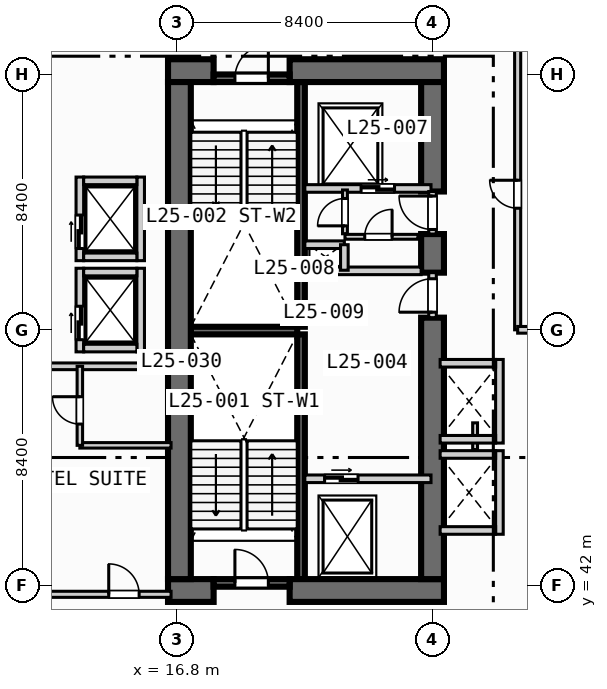
"""IFC4 building model, lengths in metres.
Left out: names, types, materials, properties, quantities, classifications, styles, units other than length and angle.
Written with IfcOpenShell. Run it as: python <this file> out.ifc"""

import sys

from ifc_helpers import new_model, si_unit, direction, frame, frame_2d, origin, place, context, subcontext, project, spatial, rectangle, extrude, element, fill, save


model = new_model("IFC4")
c1 = context("Model", 3, precision=1e-05, world=origin(), true_north=direction((0.0, 1.0)))
c2 = subcontext(c1, "Body", "Model", "MODEL_VIEW")
j1 = project(units=[si_unit("LENGTHUNIT", "METRE"), si_unit("PLANEANGLEUNIT", "RADIAN")], contexts=[c1])
p1 = place(None, origin())
s1 = spatial("IfcSite", under=j1, at=p1, CompositionType="ELEMENT")
p2 = place(p1, origin())
s2 = spatial("IfcBuilding", under=s1, at=p2, CompositionType="ELEMENT")
p3 = place(p2, frame((0.0, 0.0, 107.6)))
s3 = spatial("IfcBuildingStorey", under=s2, at=p3, CompositionType="ELEMENT", Elevation=107.6)
for number, where, z_axis, x_axis in (
    (1, (20.875, 42.2, 0.0), (0.0, 0.0, 1.0), (0.0, 1.0, 0.0)),
    (2, (20.875, 50.5, 0.0), (0.0, 0.0, 1.0), (0.0, 1.0, 0.0)),
):
    element("IfcWall", number, at=place(p3, frame(where, z_axis=z_axis, x_axis=x_axis)), inside=s3, PredefinedType="SOLIDWALL", context=c2, shape_type="SweptSolid", body=[
        extrude(rectangle(XDim=8.05, YDim=0.25, at=frame_2d((4.025, 0.0))), origin(), (0.0, 0.0, 1.0), 3.55),
    ])
p4 = place(p3, frame((17.25, 50.375, 0.0), z_axis=(0.0, 0.0, 1.0), x_axis=(1.0, 0.0, 0.0)))
e3 = element("IfcWall", 3, at=p4, inside=s3, PredefinedType="SOLIDWALL", context=c2, shape_type="SweptSolid", body=[
    extrude(rectangle(XDim=3.5, YDim=0.25, at=frame_2d((1.75, 0.0))), origin(), (0.0, 0.0, 1.0), 3.55),
])
p5 = place(p3, frame((16.5, 41.825, 0.0), z_axis=(0.0, 0.0, 1.0), x_axis=(1.0, 0.0, 0.0)))
e4 = element("IfcWall", 4, at=p5, inside=s3, PredefinedType="SHEAR", context=c2, shape_type="SweptSolid", body=[
    extrude(rectangle(XDim=1.5, YDim=0.75, at=frame_2d((0.75, 0.0))), origin(), (0.0, 0.0, 1.0), 3.55),
])
p6 = place(p3, frame((20.5, 41.825, 0.0), z_axis=(0.0, 0.0, 1.0), x_axis=(1.0, 0.0, 0.0)))
e5 = element("IfcWall", 5, at=p6, inside=s3, PredefinedType="SHEAR", context=c2, shape_type="SweptSolid", body=[
    extrude(rectangle(XDim=5.075, YDim=0.75, at=frame_2d((2.538, 0.0))), origin(), (0.0, 0.0, 1.0), 3.55),
])
p7 = place(p3, frame((16.5, 58.925, 0.0), z_axis=(0.0, 0.0, 1.0), x_axis=(1.0, 0.0, 0.0)))
e6 = element("IfcWall", 6, at=p7, inside=s3, PredefinedType="SHEAR", context=c2, shape_type="SweptSolid", body=[
    extrude(rectangle(XDim=1.5, YDim=0.75, at=frame_2d((0.75, 0.0))), origin(), (0.0, 0.0, 1.0), 3.55),
])
p8 = place(p3, frame((20.5, 58.925, 0.0), z_axis=(0.0, 0.0, 1.0), x_axis=(1.0, 0.0, 0.0)))
e7 = element("IfcWall", 7, at=p8, inside=s3, PredefinedType="SHEAR", context=c2, shape_type="SweptSolid", body=[
    extrude(rectangle(XDim=5.075, YDim=0.75, at=frame_2d((2.538, 0.0))), origin(), (0.0, 0.0, 1.0), 3.55),
])
p9 = place(p3, frame((16.875, 42.2, 0.0), z_axis=(0.0, 0.0, 1.0), x_axis=(0.0, 1.0, 0.0)))
e8 = element("IfcWall", 8, at=p9, inside=s3, PredefinedType="SHEAR", context=c2, shape_type="SweptSolid", body=[
    extrude(rectangle(XDim=16.35, YDim=0.75, at=frame_2d((8.175, 0.0))), origin(), (0.0, 0.0, 1.0), 3.55),
])
p10 = place(p3, frame((25.2, 42.2, 0.0), z_axis=(0.0, 0.0, 1.0), x_axis=(0.0, 1.0, 0.0)))
e9 = element("IfcWall", 9, at=p10, inside=s3, PredefinedType="SHEAR", context=c2, shape_type="SweptSolid", body=[
    extrude(rectangle(XDim=8.6, YDim=0.75, at=frame_2d((4.3, 0.0))), origin(), (0.0, 0.0, 1.0), 3.55),
])
p11 = place(p3, frame((25.2, 52.28, 0.0), z_axis=(0.0, 0.0, 1.0), x_axis=(0.0, 1.0, 0.0)))
e10 = element("IfcWall", 10, at=p11, inside=s3, PredefinedType="SHEAR", context=c2, shape_type="SweptSolid", body=[
    extrude(rectangle(XDim=1.27, YDim=0.75, at=frame_2d((0.635, 0.0))), origin(), (0.0, 0.0, 1.0), 3.55),
])
p12 = place(p3, frame((25.2, 54.95, 0.0), z_axis=(0.0, 0.0, 1.0), x_axis=(0.0, 1.0, 0.0)))
e11 = element("IfcWall", 11, at=p12, inside=s3, PredefinedType="SHEAR", context=c2, shape_type="SweptSolid", body=[
    extrude(rectangle(XDim=3.6, YDim=0.75, at=frame_2d((1.8, 0.0))), origin(), (0.0, 0.0, 1.0), 3.55),
])
p13 = place(p3, frame((18.0, 42.075, 0.0), z_axis=(0.0, 0.0, 1.0), x_axis=(1.0, 0.0, 0.0)))
e12 = element("IfcWall", 12, at=p13, inside=s3, PredefinedType="SOLIDWALL", context=c2, shape_type="SweptSolid", body=[
    extrude(rectangle(XDim=2.5, YDim=0.25, at=frame_2d((1.25, 0.0))), origin(), (0.0, 0.0, 1.0), 3.55),
])
p14 = place(p13, frame((0.7, 0.0, 0.0)))
e13 = element("IfcOpeningElement", 13, at=p14, cuts=e12, PredefinedType="OPENING", context=c2, shape_type="SweptSolid", body=[
    extrude(rectangle(XDim=1.1, YDim=2.15, at=frame_2d((0.55, 1.075))), frame((0.0, 0.135, 0.0), z_axis=(0.0, -1.0, 0.0), x_axis=(1.0, 0.0, 0.0)), (0.0, 0.0, 1.0), 0.27),
])
p15 = place(p3, frame((18.0, 58.675, 0.0), z_axis=(0.0, 0.0, 1.0), x_axis=(1.0, 0.0, 0.0)))
e14 = element("IfcWall", 14, at=p15, inside=s3, PredefinedType="SOLIDWALL", context=c2, shape_type="SweptSolid", body=[
    extrude(rectangle(XDim=2.5, YDim=0.25, at=frame_2d((1.25, 0.0))), origin(), (0.0, 0.0, 1.0), 3.55),
])
p16 = place(p15, frame((0.7, 0.0, 0.0)))
e15 = element("IfcOpeningElement", 15, at=p16, cuts=e14, PredefinedType="OPENING", context=c2, shape_type="SweptSolid", body=[
    extrude(rectangle(XDim=1.1, YDim=2.15, at=frame_2d((0.55, 1.075))), frame((0.0, 0.135, 0.0), z_axis=(0.0, -1.0, 0.0), x_axis=(1.0, 0.0, 0.0)), (0.0, 0.0, 1.0), 0.27),
])
p17 = place(p3, frame((21.0, 45.5, 0.0), z_axis=(0.0, 0.0, 1.0), x_axis=(1.0, 0.0, 0.0)))
e16 = element("IfcWall", 16, at=p17, inside=s3, PredefinedType="SOLIDWALL", context=c2, shape_type="SweptSolid", body=[
    extrude(rectangle(XDim=4.15, YDim=0.25, at=frame_2d((2.075, 0.0))), origin(), (0.0, 0.0, 1.0), 3.55),
])
p18 = place(p17, frame((0.65, 0.0, 0.0)))
e17 = element("IfcOpeningElement", 17, at=p18, cuts=e16, PredefinedType="OPENING", context=c2, shape_type="SweptSolid", body=[
    extrude(rectangle(XDim=1.1, YDim=2.15, at=frame_2d((0.55, 1.075))), frame((0.0, 0.135, 0.0), z_axis=(0.0, -1.0, 0.0), x_axis=(1.0, 0.0, 0.0)), (0.0, 0.0, 1.0), 0.27),
])
p19 = place(p3, frame((25.2, 50.8, 0.0), z_axis=(0.0, 0.0, 1.0), x_axis=(0.0, 1.0, 0.0)))
e18 = element("IfcWall", 18, at=p19, inside=s3, PredefinedType="SOLIDWALL", context=c2, shape_type="SweptSolid", body=[
    extrude(rectangle(XDim=1.48, YDim=0.25, at=frame_2d((0.74, 0.0))), origin(), (0.0, 0.0, 1.0), 3.55),
])
p20 = place(p19, frame((0.18, 0.0, 0.0)))
e19 = element("IfcOpeningElement", 19, at=p20, cuts=e18, PredefinedType="OPENING", context=c2, shape_type="SweptSolid", body=[
    extrude(rectangle(XDim=1.1, YDim=2.15, at=frame_2d((0.55, 1.075))), frame((0.0, 0.135, 0.0), z_axis=(0.0, -1.0, 0.0), x_axis=(1.0, 0.0, 0.0)), (0.0, 0.0, 1.0), 0.27),
])
p21 = place(p3, frame((21.0, 52.34, 0.0), z_axis=(0.0, 0.0, 1.0), x_axis=(1.0, 0.0, 0.0)))
e20 = element("IfcWall", 20, at=p21, inside=s3, PredefinedType="SOLIDWALL", context=c2, shape_type="SweptSolid", body=[
    extrude(rectangle(XDim=3.825, YDim=0.25, at=frame_2d((1.913, 0.0))), origin(), (0.0, 0.0, 1.0), 3.55),
])
p22 = place(p3, frame((21.0, 55.05, 0.0), z_axis=(0.0, 0.0, 1.0), x_axis=(1.0, 0.0, 0.0)))
e21 = element("IfcWall", 21, at=p22, inside=s3, PredefinedType="SOLIDWALL", context=c2, shape_type="SweptSolid", body=[
    extrude(rectangle(XDim=4.15, YDim=0.25, at=frame_2d((2.075, 0.0))), origin(), (0.0, 0.0, 1.0), 3.55),
])
p23 = place(p22, frame((1.85, 0.0, 0.0)))
e22 = element("IfcOpeningElement", 22, at=p23, cuts=e21, PredefinedType="OPENING", context=c2, shape_type="SweptSolid", body=[
    extrude(rectangle(XDim=1.1, YDim=2.15, at=frame_2d((0.55, 1.075))), frame((0.0, 0.135, 0.0), z_axis=(0.0, -1.0, 0.0), x_axis=(1.0, 0.0, 0.0)), (0.0, 0.0, 1.0), 0.27),
])
p24 = place(p3, frame((25.2, 53.55, 0.0), z_axis=(0.0, 0.0, 1.0), x_axis=(0.0, 1.0, 0.0)))
e23 = element("IfcWall", 23, at=p24, inside=s3, PredefinedType="SOLIDWALL", context=c2, shape_type="SweptSolid", body=[
    extrude(rectangle(XDim=1.4, YDim=0.25, at=frame_2d((0.7, 0.0))), origin(), (0.0, 0.0, 1.0), 3.55),
])
p25 = place(p24, frame((0.15, 0.0, 0.0)))
e24 = element("IfcOpeningElement", 24, at=p25, cuts=e23, PredefinedType="OPENING", context=c2, shape_type="SweptSolid", body=[
    extrude(rectangle(XDim=1.1, YDim=2.15, at=frame_2d((0.55, 1.075))), frame((0.0, 0.135, 0.0), z_axis=(0.0, -1.0, 0.0), x_axis=(1.0, 0.0, 0.0)), (0.0, 0.0, 1.0), 0.27),
])
p26 = place(p3, frame((21.0, 53.2, 0.0), z_axis=(0.0, 0.0, 1.0), x_axis=(1.0, 0.0, 0.0)))
e25 = element("IfcWall", 25, at=p26, inside=s3, PredefinedType="SOLIDWALL", context=c2, shape_type="SweptSolid", body=[
    extrude(rectangle(XDim=1.3, YDim=0.25, at=frame_2d((0.65, 0.0))), origin(), (0.0, 0.0, 1.0), 3.55),
])
p27 = place(p3, frame((22.3, 52.36, 0.0), z_axis=(0.0, 0.0, 1.0), x_axis=(0.0, 1.0, 0.0)))
e26 = element("IfcWall", 26, at=p27, inside=s3, PredefinedType="SOLIDWALL", context=c2, shape_type="SweptSolid", body=[
    extrude(rectangle(XDim=0.84, YDim=0.25, at=frame_2d((0.42, 0.0))), origin(), (0.0, 0.0, 1.0), 3.55),
])
p28 = place(p3, frame((22.32, 53.56, 0.0), z_axis=(0.0, 0.0, 1.0), x_axis=(0.0, 1.0, 0.0)))
e27 = element("IfcWall", 27, at=p28, inside=s3, PredefinedType="PARTITIONING", context=c2, shape_type="SweptSolid", body=[
    extrude(rectangle(XDim=1.44, YDim=0.16, at=frame_2d((0.72, 0.0))), origin(), (0.0, 0.0, 1.0), 3.55),
])
p29 = place(p28, frame((0.26, 0.0, 0.0)))
e28 = element("IfcOpeningElement", 28, at=p29, cuts=e27, PredefinedType="OPENING", context=c2, shape_type="SweptSolid", body=[
    extrude(rectangle(XDim=0.9, YDim=2.1, at=frame_2d((0.45, 1.05))), frame((0.0, 0.09, 0.0), z_axis=(0.0, -1.0, 0.0), x_axis=(1.0, 0.0, 0.0)), (0.0, 0.0, 1.0), 0.18),
])
p30 = place(p3, frame((22.32, 53.46, 0.0), z_axis=(0.0, 0.0, 1.0), x_axis=(1.0, 0.0, 0.0)))
e29 = element("IfcWall", 29, at=p30, inside=s3, PredefinedType="PARTITIONING", context=c2, shape_type="SweptSolid", body=[
    extrude(rectangle(XDim=2.4, YDim=0.16, at=frame_2d((1.2, 0.0))), origin(), (0.0, 0.0, 1.0), 3.55),
])
p31 = place(p30, frame((0.65, 0.0, 0.0)))
e30 = element("IfcOpeningElement", 30, at=p31, cuts=e29, PredefinedType="OPENING", context=c2, shape_type="SweptSolid", body=[
    extrude(rectangle(XDim=0.9, YDim=2.1, at=frame_2d((0.45, 1.05))), frame((0.0, 0.09, 0.0), z_axis=(0.0, -1.0, 0.0), x_axis=(1.0, 0.0, 0.0)), (0.0, 0.0, 1.0), 0.18),
])
p32 = place(p3, frame((13.6, 49.675, 0.0), z_axis=(0.0, 0.0, 1.0), x_axis=(0.0, 1.0, 0.0)))
e31 = element("IfcWall", 31, at=p32, inside=s3, PredefinedType="SOLIDWALL", context=c2, shape_type="SweptSolid", body=[
    extrude(rectangle(XDim=2.75, YDim=0.25, at=frame_2d((1.375, 0.0))), origin(), (0.0, 0.0, 1.0), 3.55),
])
p33 = place(p32, frame((0.4, 0.0, 0.0)))
e32 = element("IfcOpeningElement", 32, at=p33, cuts=e31, PredefinedType="OPENING", context=c2, shape_type="SweptSolid", body=[
    extrude(rectangle(XDim=1.1, YDim=2.15, at=frame_2d((0.55, 1.075))), frame((0.0, 0.135, 0.0), z_axis=(0.0, -1.0, 0.0), x_axis=(1.0, 0.0, 0.0)), (0.0, 0.0, 1.0), 0.27),
])
p34 = place(p3, frame((15.6, 49.675, 0.0), z_axis=(0.0, 0.0, 1.0), x_axis=(0.0, 1.0, 0.0)))
e33 = element("IfcWall", 33, at=p34, inside=s3, PredefinedType="SOLIDWALL", context=c2, shape_type="SweptSolid", body=[
    extrude(rectangle(XDim=2.75, YDim=0.25, at=frame_2d((1.375, 0.0))), origin(), (0.0, 0.0, 1.0), 3.55),
])
for number, where, z_axis, x_axis in (
    (34, (13.725, 49.8, 0.0), (0.0, 0.0, 1.0), (1.0, 0.0, 0.0)),
    (35, (13.725, 52.3, 0.0), (0.0, 0.0, 1.0), (1.0, 0.0, 0.0)),
):
    element("IfcWall", number, at=place(p3, frame(where, z_axis=z_axis, x_axis=x_axis)), inside=s3, PredefinedType="SOLIDWALL", context=c2, shape_type="SweptSolid", body=[
        extrude(rectangle(XDim=1.75, YDim=0.25, at=frame_2d((0.875, 0.0))), origin(), (0.0, 0.0, 1.0), 3.55),
    ])
p35 = place(p3, frame((13.6, 52.675, 0.0), z_axis=(0.0, 0.0, 1.0), x_axis=(0.0, 1.0, 0.0)))
e36 = element("IfcWall", 36, at=p35, inside=s3, PredefinedType="SOLIDWALL", context=c2, shape_type="SweptSolid", body=[
    extrude(rectangle(XDim=2.75, YDim=0.25, at=frame_2d((1.375, 0.0))), origin(), (0.0, 0.0, 1.0), 3.55),
])
p36 = place(p35, frame((0.4, 0.0, 0.0)))
e37 = element("IfcOpeningElement", 37, at=p36, cuts=e36, PredefinedType="OPENING", context=c2, shape_type="SweptSolid", body=[
    extrude(rectangle(XDim=1.1, YDim=2.15, at=frame_2d((0.55, 1.075))), frame((0.0, 0.135, 0.0), z_axis=(0.0, -1.0, 0.0), x_axis=(1.0, 0.0, 0.0)), (0.0, 0.0, 1.0), 0.27),
])
p37 = place(p3, frame((15.6, 52.675, 0.0), z_axis=(0.0, 0.0, 1.0), x_axis=(0.0, 1.0, 0.0)))
e38 = element("IfcWall", 38, at=p37, inside=s3, PredefinedType="SOLIDWALL", context=c2, shape_type="SweptSolid", body=[
    extrude(rectangle(XDim=2.75, YDim=0.25, at=frame_2d((1.375, 0.0))), origin(), (0.0, 0.0, 1.0), 3.55),
])
for number, where, z_axis, x_axis in (
    (39, (13.725, 52.8, 0.0), (0.0, 0.0, 1.0), (1.0, 0.0, 0.0)),
    (40, (13.725, 55.3, 0.0), (0.0, 0.0, 1.0), (1.0, 0.0, 0.0)),
):
    element("IfcWall", number, at=place(p3, frame(where, z_axis=z_axis, x_axis=x_axis)), inside=s3, PredefinedType="SOLIDWALL", context=c2, shape_type="SweptSolid", body=[
        extrude(rectangle(XDim=1.75, YDim=0.25, at=frame_2d((0.875, 0.0))), origin(), (0.0, 0.0, 1.0), 3.55),
    ])
p38 = place(p3, frame((27.4, 43.675, 0.0), z_axis=(0.0, 0.0, 1.0), x_axis=(0.0, 1.0, 0.0)))
e41 = element("IfcWall", 41, at=p38, inside=s3, PredefinedType="SOLIDWALL", context=c2, shape_type="SweptSolid", body=[
    extrude(rectangle(XDim=2.75, YDim=0.25, at=frame_2d((1.375, 0.0))), origin(), (0.0, 0.0, 1.0), 3.55),
])
for number, where, z_axis, x_axis in (
    (42, (25.45, 43.8, 0.0), (0.0, 0.0, 1.0), (1.0, 0.0, 0.0)),
    (43, (25.45, 46.3, 0.0), (0.0, 0.0, 1.0), (1.0, 0.0, 0.0)),
):
    element("IfcWall", number, at=place(p3, frame(where, z_axis=z_axis, x_axis=x_axis)), inside=s3, PredefinedType="SOLIDWALL", context=c2, shape_type="SweptSolid", body=[
        extrude(rectangle(XDim=1.825, YDim=0.25, at=frame_2d((0.913, 0.0))), origin(), (0.0, 0.0, 1.0), 3.55),
    ])
p39 = place(p3, frame((26.6, 46.46, 0.0), z_axis=(0.0, 0.0, 1.0), x_axis=(0.0, 1.0, 0.0)))
e44 = element("IfcWall", 44, at=p39, inside=s3, PredefinedType="PARTITIONING", context=c2, shape_type="SweptSolid", body=[
    extrude(rectangle(XDim=0.88, YDim=0.16, at=frame_2d((0.44, 0.0))), origin(), (0.0, 0.0, 1.0), 3.55),
])
p40 = place(p3, frame((27.4, 46.675, 0.0), z_axis=(0.0, 0.0, 1.0), x_axis=(0.0, 1.0, 0.0)))
e45 = element("IfcWall", 45, at=p40, inside=s3, PredefinedType="SOLIDWALL", context=c2, shape_type="SweptSolid", body=[
    extrude(rectangle(XDim=2.75, YDim=0.25, at=frame_2d((1.375, 0.0))), origin(), (0.0, 0.0, 1.0), 3.55),
])
for number, where, z_axis, x_axis in (
    (46, (25.45, 46.8, 0.0), (0.0, 0.0, 1.0), (1.0, 0.0, 0.0)),
    (47, (25.45, 49.3, 0.0), (0.0, 0.0, 1.0), (1.0, 0.0, 0.0)),
):
    element("IfcWall", number, at=place(p3, frame(where, z_axis=z_axis, x_axis=x_axis)), inside=s3, PredefinedType="SOLIDWALL", context=c2, shape_type="SweptSolid", body=[
        extrude(rectangle(XDim=1.825, YDim=0.25, at=frame_2d((0.913, 0.0))), origin(), (0.0, 0.0, 1.0), 3.55),
    ])
p41 = place(p3, frame((0.35, 41.7, 0.0), z_axis=(0.0, 0.0, 1.0), x_axis=(1.0, 0.0, 0.0)))
e48 = element("IfcWall", 48, at=p41, inside=s3, PredefinedType="PARTITIONING", context=c2, shape_type="SweptSolid", body=[
    extrude(rectangle(XDim=16.25, YDim=0.2, at=frame_2d((8.125, 0.0))), origin(), (0.0, 0.0, 1.0), 2.8),
])
p42 = place(p41, frame((14.2, 0.0, 0.0)))
e49 = element("IfcOpeningElement", 49, at=p42, cuts=e48, PredefinedType="OPENING", context=c2, shape_type="SweptSolid", body=[
    extrude(rectangle(XDim=1.0, YDim=2.15, at=frame_2d((0.5, 1.075))), frame((0.0, 0.11, 0.0), z_axis=(0.0, -1.0, 0.0), x_axis=(1.0, 0.0, 0.0)), (0.0, 0.0, 1.0), 0.22),
])
p43 = place(p3, frame((0.35, 49.2, 0.0), z_axis=(0.0, 0.0, 1.0), x_axis=(1.0, 0.0, 0.0)))
e50 = element("IfcWall", 50, at=p43, inside=s3, PredefinedType="PARTITIONING", context=c2, shape_type="SweptSolid", body=[
    extrude(rectangle(XDim=16.25, YDim=0.22, at=frame_2d((8.125, 0.0))), origin(), (0.0, 0.0, 1.0), 3.55),
])
p44 = place(p3, frame((13.6, 46.6, 0.0), z_axis=(0.0, 0.0, 1.0), x_axis=(1.0, 0.0, 0.0)))
e51 = element("IfcWall", 51, at=p44, inside=s3, PredefinedType="PLUMBINGWALL", context=c2, shape_type="SweptSolid", body=[
    extrude(rectangle(XDim=3.0, YDim=0.18, at=frame_2d((1.5, 0.0))), origin(), (0.0, 0.0, 1.0), 3.55),
])
p45 = place(p3, frame((13.6, 46.6, 0.0), z_axis=(0.0, 0.0, 1.0), x_axis=(0.0, 1.0, 0.0)))
e52 = element("IfcWall", 52, at=p45, inside=s3, PredefinedType="PLUMBINGWALL", context=c2, shape_type="SweptSolid", body=[
    extrude(rectangle(XDim=2.6, YDim=0.18, at=frame_2d((1.3, 0.0))), origin(), (0.0, 0.0, 1.0), 3.55),
])
p46 = place(p45, frame((0.7, 0.0, 0.0)))
e53 = element("IfcOpeningElement", 53, at=p46, cuts=e52, PredefinedType="OPENING", context=c2, shape_type="SweptSolid", body=[
    extrude(rectangle(XDim=0.9, YDim=2.1, at=frame_2d((0.45, 1.05))), frame((0.0, 0.1, 0.0), z_axis=(0.0, -1.0, 0.0), x_axis=(1.0, 0.0, 0.0)), (0.0, 0.0, 1.0), 0.2),
])
p47 = place(p3, frame((28.0, 50.4, 0.0), z_axis=(0.0, 0.0, 1.0), x_axis=(0.0, 1.0, 0.0)))
e54 = element("IfcWall", 54, at=p47, inside=s3, PredefinedType="PARTITIONING", context=c2, shape_type="SweptSolid", body=[
    extrude(rectangle(XDim=38.6, YDim=0.2, at=frame_2d((19.3, 0.0))), origin(), (0.0, 0.0, 1.0), 3.55),
])
p48 = place(p47, frame((4.0, 0.0, 0.0)))
e55 = element("IfcOpeningElement", 55, at=p48, cuts=e54, PredefinedType="OPENING", context=c2, shape_type="SweptSolid", body=[
    extrude(rectangle(XDim=0.92, YDim=2.1, at=frame_2d((0.46, 1.05))), frame((0.0, 0.11, 0.0), z_axis=(0.0, -1.0, 0.0), x_axis=(1.0, 0.0, 0.0)), (0.0, 0.0, 1.0), 0.22),
])
p49 = place(p3, frame((28.0, 50.4, 0.0), z_axis=(0.0, 0.0, 1.0), x_axis=(1.0, 0.0, 0.0)))
e56 = element("IfcWall", 56, at=p49, inside=s3, PredefinedType="PARTITIONING", context=c2, shape_type="SweptSolid", body=[
    extrude(rectangle(XDim=5.3, YDim=0.22, at=frame_2d((2.65, 0.0))), origin(), (0.0, 0.0, 1.0), 2.8),
])
p50 = place(p14, origin())
e57 = element("IfcDoor", 57, at=p50, inside=s3, OperationType="SINGLE_SWING_LEFT", PredefinedType="DOOR", context=c2, shape_type="SweptSolid", body=[
    extrude(rectangle(XDim=1.1, YDim=2.15, at=frame_2d((0.55, 1.075))), frame((0.0, 0.025, 0.0), z_axis=(0.0, -1.0, 0.0), x_axis=(1.0, 0.0, 0.0)), (0.0, 0.0, 1.0), 0.05),
])
fill(e13, e57)
p51 = place(p16, origin())
e58 = element("IfcDoor", 58, at=p51, inside=s3, OperationType="SINGLE_SWING_RIGHT", PredefinedType="DOOR", context=c2, shape_type="SweptSolid", body=[
    extrude(rectangle(XDim=1.1, YDim=2.15, at=frame_2d((0.55, 1.075))), frame((0.0, 0.025, 0.0), z_axis=(0.0, -1.0, 0.0), x_axis=(1.0, 0.0, 0.0)), (0.0, 0.0, 1.0), 0.05),
])
fill(e15, e58)
p52 = place(p18, origin())
e59 = element("IfcDoor", 59, at=p52, inside=s3, OperationType="SLIDING_TO_LEFT", PredefinedType="DOOR", context=c2, shape_type="SweptSolid", body=[
    extrude(rectangle(XDim=1.1, YDim=2.15, at=frame_2d((0.55, 1.075))), frame((0.0, 0.025, 0.0), z_axis=(0.0, -1.0, 0.0), x_axis=(1.0, 0.0, 0.0)), (0.0, 0.0, 1.0), 0.05),
])
fill(e17, e59)
p53 = place(p20, origin())
e60 = element("IfcDoor", 60, at=p53, inside=s3, OperationType="SINGLE_SWING_LEFT", PredefinedType="DOOR", context=c2, shape_type="SweptSolid", body=[
    extrude(rectangle(XDim=1.1, YDim=2.15, at=frame_2d((0.55, 1.075))), frame((0.0, 0.025, 0.0), z_axis=(0.0, -1.0, 0.0), x_axis=(1.0, 0.0, 0.0)), (0.0, 0.0, 1.0), 0.05),
])
fill(e19, e60)
p54 = place(p23, origin())
e61 = element("IfcDoor", 61, at=p54, inside=s3, OperationType="SLIDING_TO_LEFT", PredefinedType="DOOR", context=c2, shape_type="SweptSolid", body=[
    extrude(rectangle(XDim=1.1, YDim=2.15, at=frame_2d((0.55, 1.075))), frame((0.0, 0.025, 0.0), z_axis=(0.0, -1.0, 0.0), x_axis=(1.0, 0.0, 0.0)), (0.0, 0.0, 1.0), 0.05),
])
fill(e22, e61)
p55 = place(p25, origin())
e62 = element("IfcDoor", 62, at=p55, inside=s3, OperationType="SINGLE_SWING_RIGHT", PredefinedType="DOOR", context=c2, shape_type="SweptSolid", body=[
    extrude(rectangle(XDim=1.1, YDim=2.15, at=frame_2d((0.55, 1.075))), frame((0.0, 0.025, 0.0), z_axis=(0.0, -1.0, 0.0), x_axis=(1.0, 0.0, 0.0)), (0.0, 0.0, 1.0), 0.05),
])
fill(e24, e62)
p56 = place(p29, origin())
e63 = element("IfcDoor", 63, at=p56, inside=s3, OperationType="SINGLE_SWING_LEFT", PredefinedType="DOOR", context=c2, shape_type="SweptSolid", body=[
    extrude(rectangle(XDim=0.9, YDim=2.1, at=frame_2d((0.45, 1.05))), frame((0.0, 0.025, 0.0), z_axis=(0.0, -1.0, 0.0), x_axis=(1.0, 0.0, 0.0)), (0.0, 0.0, 1.0), 0.05),
])
fill(e28, e63)
p57 = place(p31, origin())
e64 = element("IfcDoor", 64, at=p57, inside=s3, OperationType="SINGLE_SWING_RIGHT", PredefinedType="DOOR", context=c2, shape_type="SweptSolid", body=[
    extrude(rectangle(XDim=0.9, YDim=2.1, at=frame_2d((0.45, 1.05))), frame((0.0, 0.025, 0.0), z_axis=(0.0, -1.0, 0.0), x_axis=(1.0, 0.0, 0.0)), (0.0, 0.0, 1.0), 0.05),
])
fill(e30, e64)
p58 = place(p33, origin())
e65 = element("IfcDoor", 65, at=p58, inside=s3, OperationType="SLIDING_TO_LEFT", PredefinedType="DOOR", context=c2, shape_type="SweptSolid", body=[
    extrude(rectangle(XDim=1.1, YDim=2.15, at=frame_2d((0.55, 1.075))), frame((0.0, 0.025, 0.0), z_axis=(0.0, -1.0, 0.0), x_axis=(1.0, 0.0, 0.0)), (0.0, 0.0, 1.0), 0.05),
])
fill(e32, e65)
p59 = place(p36, origin())
e66 = element("IfcDoor", 66, at=p59, inside=s3, OperationType="SLIDING_TO_LEFT", PredefinedType="DOOR", context=c2, shape_type="SweptSolid", body=[
    extrude(rectangle(XDim=1.1, YDim=2.15, at=frame_2d((0.55, 1.075))), frame((0.0, 0.025, 0.0), z_axis=(0.0, -1.0, 0.0), x_axis=(1.0, 0.0, 0.0)), (0.0, 0.0, 1.0), 0.05),
])
fill(e37, e66)
p60 = place(p42, origin())
e67 = element("IfcDoor", 67, at=p60, inside=s3, OperationType="SINGLE_SWING_LEFT", PredefinedType="DOOR", context=c2, shape_type="SweptSolid", body=[
    extrude(rectangle(XDim=1.0, YDim=2.15, at=frame_2d((0.5, 1.075))), frame((0.0, 0.025, 0.0), z_axis=(0.0, -1.0, 0.0), x_axis=(1.0, 0.0, 0.0)), (0.0, 0.0, 1.0), 0.05),
])
fill(e49, e67)
p61 = place(p46, origin())
e68 = element("IfcDoor", 68, at=p61, inside=s3, OperationType="SINGLE_SWING_RIGHT", PredefinedType="DOOR", context=c2, shape_type="SweptSolid", body=[
    extrude(rectangle(XDim=0.9, YDim=2.1, at=frame_2d((0.45, 1.05))), frame((0.0, 0.025, 0.0), z_axis=(0.0, -1.0, 0.0), x_axis=(1.0, 0.0, 0.0)), (0.0, 0.0, 1.0), 0.05),
])
fill(e53, e68)
p62 = place(p48, origin())
e69 = element("IfcDoor", 69, at=p62, inside=s3, OperationType="SINGLE_SWING_RIGHT", PredefinedType="DOOR", context=c2, shape_type="SweptSolid", body=[
    extrude(rectangle(XDim=0.92, YDim=2.1, at=frame_2d((0.46, 1.05))), frame((0.0, 0.025, 0.0), z_axis=(0.0, -1.0, 0.0), x_axis=(1.0, 0.0, 0.0)), (0.0, 0.0, 1.0), 0.05),
])
fill(e55, e69)
save(model, sys.argv[1])
